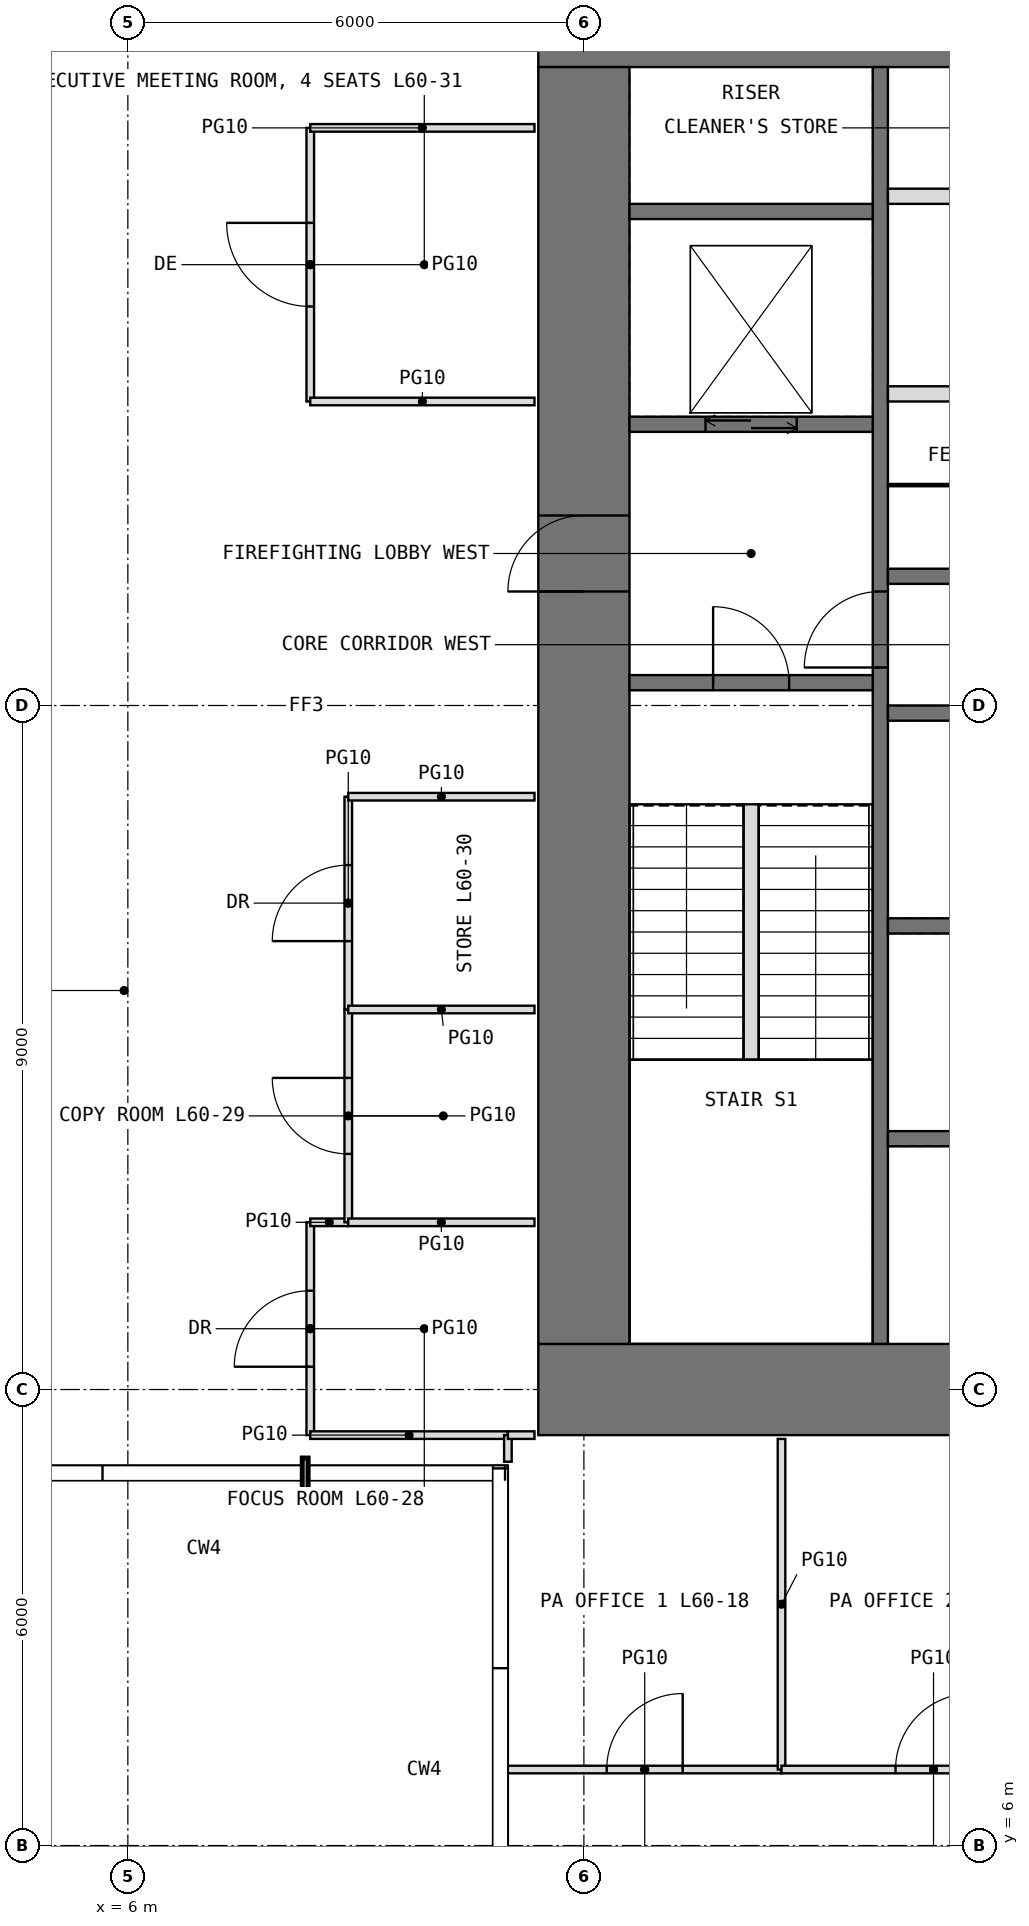
"""IFC4 building model, lengths in metres.
Left out: names, types, materials, properties, quantities, classifications, styles, units other than length and angle.
Written with IfcOpenShell. Run it as: python <this file> out.ifc"""

import sys

from ifc_helpers import new_model, si_unit, direction, frame, frame_2d, origin, place, context, subcontext, project, spatial, rectangle, extrude, element, fill, save


model = new_model("IFC4")
c1 = context("Model", 3, precision=1e-05, world=origin(), true_north=direction((0.0, 1.0)))
c2 = subcontext(c1, "Body", "Model", "MODEL_VIEW")
j1 = project(units=[si_unit("LENGTHUNIT", "METRE"), si_unit("PLANEANGLEUNIT", "RADIAN")], contexts=[c1])
p1 = place(None, origin())
s1 = spatial("IfcSite", under=j1, at=p1, CompositionType="ELEMENT")
p2 = place(p1, origin())
s2 = spatial("IfcBuilding", under=s1, at=p2, CompositionType="ELEMENT")
p3 = place(p2, frame((0.0, 0.0, 252.4)))
s3 = spatial("IfcBuildingStorey", under=s2, at=p3, CompositionType="ELEMENT", Elevation=252.4)
p4 = place(p3, frame((11.4, 12.0, -0.05), z_axis=(0.0, 0.0, 1.0), x_axis=(1.0, 0.0, 0.0)))
e1 = element("IfcWall", 1, at=p4, inside=s3, PredefinedType="SHEAR", context=c2, shape_type="SweptSolid", body=[
    extrude(rectangle(XDim=19.2, YDim=1.2, at=frame_2d((9.6, 0.0))), origin(), (0.0, 0.0, 1.0), 4.2),
])
p5 = place(p4, frame((8.6, 0.0, 0.05)))
e2 = element("IfcOpeningElement", 2, at=p5, cuts=e1, PredefinedType="OPENING", context=c2, shape_type="SweptSolid", body=[
    extrude(rectangle(XDim=2.0, YDim=2.2, at=frame_2d((1.0, 1.1))), frame((0.0, 0.61, 0.0), z_axis=(0.0, -1.0, 0.0), x_axis=(1.0, 0.0, 0.0)), (0.0, 0.0, 1.0), 1.22),
])
p6 = place(p3, frame((11.4, 30.0, -0.05), z_axis=(0.0, 0.0, 1.0), x_axis=(1.0, 0.0, 0.0)))
e3 = element("IfcWall", 3, at=p6, inside=s3, PredefinedType="SHEAR", context=c2, shape_type="SweptSolid", body=[
    extrude(rectangle(XDim=19.2, YDim=1.2, at=frame_2d((9.6, 0.0))), origin(), (0.0, 0.0, 1.0), 4.2),
])
p7 = place(p6, frame((8.6, 0.0, 0.05)))
e4 = element("IfcOpeningElement", 4, at=p7, cuts=e3, PredefinedType="OPENING", context=c2, shape_type="SweptSolid", body=[
    extrude(rectangle(XDim=2.0, YDim=2.2, at=frame_2d((1.0, 1.1))), frame((0.0, 0.61, 0.0), z_axis=(0.0, -1.0, 0.0), x_axis=(1.0, 0.0, 0.0)), (0.0, 0.0, 1.0), 1.22),
])
p8 = place(p3, frame((12.0, 12.6, -0.05), z_axis=(0.0, 0.0, 1.0), x_axis=(0.0, 1.0, 0.0)))
e5 = element("IfcWall", 5, at=p8, inside=s3, PredefinedType="SHEAR", context=c2, shape_type="SweptSolid", body=[
    extrude(rectangle(XDim=16.8, YDim=1.2, at=frame_2d((8.4, 0.0))), origin(), (0.0, 0.0, 1.0), 4.2),
])
p9 = place(p8, frame((9.9, 0.0, 0.05)))
e6 = element("IfcOpeningElement", 6, at=p9, cuts=e5, PredefinedType="OPENING", context=c2, shape_type="SweptSolid", body=[
    extrude(rectangle(XDim=1.0, YDim=2.2, at=frame_2d((0.5, 1.1))), frame((0.0, 0.61, 0.0), z_axis=(0.0, -1.0, 0.0), x_axis=(1.0, 0.0, 0.0)), (0.0, 0.0, 1.0), 1.22),
])
p10 = place(p3, frame((15.9, 12.6, -0.05), z_axis=(0.0, 0.0, 1.0), x_axis=(0.0, 1.0, 0.0)))
e7 = element("IfcWall", 7, at=p10, inside=s3, PredefinedType="SHEAR", context=c2, shape_type="SweptSolid", body=[
    extrude(rectangle(XDim=16.8, YDim=0.2, at=frame_2d((8.4, 0.0))), origin(), (0.0, 0.0, 1.0), 4.2),
])
p11 = place(p10, frame((8.9, 0.0, 0.05)))
e8 = element("IfcOpeningElement", 8, at=p11, cuts=e7, PredefinedType="OPENING", context=c2, shape_type="SweptSolid", body=[
    extrude(rectangle(XDim=1.0, YDim=2.2, at=frame_2d((0.5, 1.1))), frame((0.0, 0.11, 0.0), z_axis=(0.0, -1.0, 0.0), x_axis=(1.0, 0.0, 0.0)), (0.0, 0.0, 1.0), 0.22),
])
p12 = place(p3, frame((12.6, 21.3, -0.05), z_axis=(0.0, 0.0, 1.0), x_axis=(1.0, 0.0, 0.0)))
e9 = element("IfcWall", 9, at=p12, inside=s3, PredefinedType="SHEAR", context=c2, shape_type="SweptSolid", body=[
    extrude(rectangle(XDim=3.2, YDim=0.2, at=frame_2d((1.6, 0.0))), origin(), (0.0, 0.0, 1.0), 4.2),
])
p13 = place(p12, frame((1.1, 0.0, 0.05)))
e10 = element("IfcOpeningElement", 10, at=p13, cuts=e9, PredefinedType="OPENING", context=c2, shape_type="SweptSolid", body=[
    extrude(rectangle(XDim=1.0, YDim=2.2, at=frame_2d((0.5, 1.1))), frame((0.0, 0.11, 0.0), z_axis=(0.0, -1.0, 0.0), x_axis=(1.0, 0.0, 0.0)), (0.0, 0.0, 1.0), 0.22),
])
p14 = place(p3, frame((12.6, 24.7, -0.05), z_axis=(0.0, 0.0, 1.0), x_axis=(1.0, 0.0, 0.0)))
e11 = element("IfcWall", 11, at=p14, inside=s3, PredefinedType="SHEAR", context=c2, shape_type="SweptSolid", body=[
    extrude(rectangle(XDim=3.2, YDim=0.2, at=frame_2d((1.6, 0.0))), origin(), (0.0, 0.0, 1.0), 4.2),
])
p15 = place(p14, frame((1.0, 0.0, 0.05)))
e12 = element("IfcOpeningElement", 12, at=p15, cuts=e11, PredefinedType="OPENING", context=c2, shape_type="SweptSolid", body=[
    extrude(rectangle(XDim=1.2, YDim=2.2, at=frame_2d((0.6, 1.1))), frame((0.0, 0.11, 0.0), z_axis=(0.0, -1.0, 0.0), x_axis=(1.0, 0.0, 0.0)), (0.0, 0.0, 1.0), 0.22),
])
for number, where, z_axis, x_axis in (
    (13, (12.6, 27.5, -0.05), (0.0, 0.0, 1.0), (1.0, 0.0, 0.0)),
    (14, (16.0, 15.3, -0.05), (0.0, 0.0, 1.0), (1.0, 0.0, 0.0)),
    (15, (16.0, 18.1, -0.05), (0.0, 0.0, 1.0), (1.0, 0.0, 0.0)),
    (16, (16.0, 20.9, -0.05), (0.0, 0.0, 1.0), (1.0, 0.0, 0.0)),
    (17, (16.0, 22.7, -0.05), (0.0, 0.0, 1.0), (1.0, 0.0, 0.0)),
):
    element("IfcWall", number, at=place(p3, frame(where, z_axis=z_axis, x_axis=x_axis)), inside=s3, PredefinedType="SHEAR", context=c2, shape_type="SweptSolid", body=[
        extrude(rectangle(XDim=3.2, YDim=0.2, at=frame_2d((1.6, 0.0))), origin(), (0.0, 0.0, 1.0), 4.2),
    ])
for number, where, z_axis, x_axis in (
    (18, (16.0, 25.1, 0.0), (0.0, 0.0, 1.0), (1.0, 0.0, 0.0)),
    (19, (16.0, 27.7, 0.0), (0.0, 0.0, 1.0), (1.0, 0.0, 0.0)),
):
    element("IfcWall", number, at=place(p3, frame(where, z_axis=z_axis, x_axis=x_axis)), inside=s3, PredefinedType="PARTITIONING", context=c2, shape_type="SweptSolid", body=[
        extrude(rectangle(XDim=3.2, YDim=0.2, at=frame_2d((1.6, 0.0))), origin(), (0.0, 0.0, 1.0), 3.95),
    ])
p16 = place(p3, frame((16.0, 23.9, 0.0), z_axis=(0.0, 0.0, 1.0), x_axis=(1.0, 0.0, 0.0)))
e20 = element("IfcWall", 20, at=p16, inside=s3, PredefinedType="PARTITIONING", context=c2, shape_type="SweptSolid", body=[
    extrude(rectangle(XDim=1.4, YDim=0.03, at=frame_2d((0.7, 0.0))), origin(), (0.0, 0.0, 1.0), 3.95),
])
p17 = place(p3, frame((8.4, 11.4, 0.0), z_axis=(0.0, 0.0, 1.0), x_axis=(0.0, 1.0, 0.0)))
e21 = element("IfcWall", 21, at=p17, inside=s3, PredefinedType="PARTITIONING", context=c2, shape_type="SweptSolid", body=[
    extrude(rectangle(XDim=2.8, YDim=0.1, at=frame_2d((1.4, 0.0))), origin(), (0.0, 0.0, 1.0), 3.95),
])
p18 = place(p17, frame((0.9, 0.0, 0.0)))
e22 = element("IfcOpeningElement", 22, at=p18, cuts=e21, PredefinedType="OPENING", context=c2, shape_type="SweptSolid", body=[
    extrude(rectangle(XDim=1.0, YDim=2.2, at=frame_2d((0.5, 1.1))), frame((0.0, 0.06, 0.0), z_axis=(0.0, -1.0, 0.0), x_axis=(1.0, 0.0, 0.0)), (0.0, 0.0, 1.0), 0.12),
])
p19 = place(p3, frame((8.4, 11.4, 0.0), z_axis=(0.0, 0.0, 1.0), x_axis=(1.0, 0.0, 0.0)))
e23 = element("IfcWall", 23, at=p19, inside=s3, PredefinedType="PARTITIONING", context=c2, shape_type="SweptSolid", body=[
    extrude(rectangle(XDim=2.6, YDim=0.1, at=frame_2d((1.3, 0.0))), origin(), (0.0, 0.0, 1.0), 3.95),
])
p20 = place(p3, frame((8.4, 14.2, 0.0), z_axis=(0.0, 0.0, 1.0), x_axis=(1.0, 0.0, 0.0)))
e24 = element("IfcWall", 24, at=p20, inside=s3, PredefinedType="PARTITIONING", context=c2, shape_type="SweptSolid", body=[
    extrude(rectangle(XDim=0.5, YDim=0.1, at=frame_2d((0.25, 0.0))), origin(), (0.0, 0.0, 1.0), 3.95),
])
p21 = place(p3, frame((8.4, 25.0, 0.0), z_axis=(0.0, 0.0, 1.0), x_axis=(0.0, 1.0, 0.0)))
e25 = element("IfcWall", 25, at=p21, inside=s3, PredefinedType="PARTITIONING", context=c2, shape_type="SweptSolid", body=[
    extrude(rectangle(XDim=3.6, YDim=0.1, at=frame_2d((1.8, 0.0))), origin(), (0.0, 0.0, 1.0), 3.95),
])
p22 = place(p21, frame((1.25, 0.0, 0.0)))
e26 = element("IfcOpeningElement", 26, at=p22, cuts=e25, PredefinedType="OPENING", context=c2, shape_type="SweptSolid", body=[
    extrude(rectangle(XDim=1.1, YDim=2.3, at=frame_2d((0.55, 1.15))), frame((0.0, 0.06, 0.0), z_axis=(0.0, -1.0, 0.0), x_axis=(1.0, 0.0, 0.0)), (0.0, 0.0, 1.0), 0.12),
])
for number, where, z_axis, x_axis in (
    (27, (8.4, 25.0, 0.0), (0.0, 0.0, 1.0), (1.0, 0.0, 0.0)),
    (28, (8.4, 28.6, 0.0), (0.0, 0.0, 1.0), (1.0, 0.0, 0.0)),
):
    element("IfcWall", number, at=place(p3, frame(where, z_axis=z_axis, x_axis=x_axis)), inside=s3, PredefinedType="PARTITIONING", context=c2, shape_type="SweptSolid", body=[
        extrude(rectangle(XDim=2.95, YDim=0.1, at=frame_2d((1.475, 0.0))), origin(), (0.0, 0.0, 1.0), 3.95),
    ])
p23 = place(p3, frame((8.9, 14.2, 0.0), z_axis=(0.0, 0.0, 1.0), x_axis=(0.0, 1.0, 0.0)))
e29 = element("IfcWall", 29, at=p23, inside=s3, PredefinedType="PARTITIONING", context=c2, shape_type="SweptSolid", body=[
    extrude(rectangle(XDim=2.8, YDim=0.1, at=frame_2d((1.4, 0.0))), origin(), (0.0, 0.0, 1.0), 3.95),
])
p24 = place(p23, frame((0.9, 0.0, 0.0)))
e30 = element("IfcOpeningElement", 30, at=p24, cuts=e29, PredefinedType="OPENING", context=c2, shape_type="SweptSolid", body=[
    extrude(rectangle(XDim=1.0, YDim=2.2, at=frame_2d((0.5, 1.1))), frame((0.0, 0.06, 0.0), z_axis=(0.0, -1.0, 0.0), x_axis=(1.0, 0.0, 0.0)), (0.0, 0.0, 1.0), 0.12),
])
p25 = place(p3, frame((8.9, 14.2, 0.0), z_axis=(0.0, 0.0, 1.0), x_axis=(1.0, 0.0, 0.0)))
e31 = element("IfcWall", 31, at=p25, inside=s3, PredefinedType="PARTITIONING", context=c2, shape_type="SweptSolid", body=[
    extrude(rectangle(XDim=2.45, YDim=0.1, at=frame_2d((1.225, 0.0))), origin(), (0.0, 0.0, 1.0), 3.95),
])
p26 = place(p3, frame((8.9, 17.0, 0.0), z_axis=(0.0, 0.0, 1.0), x_axis=(0.0, 1.0, 0.0)))
e32 = element("IfcWall", 32, at=p26, inside=s3, PredefinedType="PARTITIONING", context=c2, shape_type="SweptSolid", body=[
    extrude(rectangle(XDim=2.8, YDim=0.1, at=frame_2d((1.4, 0.0))), origin(), (0.0, 0.0, 1.0), 3.95),
])
p27 = place(p26, frame((0.9, 0.0, 0.0)))
e33 = element("IfcOpeningElement", 33, at=p27, cuts=e32, PredefinedType="OPENING", context=c2, shape_type="SweptSolid", body=[
    extrude(rectangle(XDim=1.0, YDim=2.2, at=frame_2d((0.5, 1.1))), frame((0.0, 0.06, 0.0), z_axis=(0.0, -1.0, 0.0), x_axis=(1.0, 0.0, 0.0)), (0.0, 0.0, 1.0), 0.12),
])
for number, where, z_axis, x_axis in (
    (34, (8.9, 17.0, 0.0), (0.0, 0.0, 1.0), (1.0, 0.0, 0.0)),
    (35, (8.9, 19.8, 0.0), (0.0, 0.0, 1.0), (1.0, 0.0, 0.0)),
):
    element("IfcWall", number, at=place(p3, frame(where, z_axis=z_axis, x_axis=x_axis)), inside=s3, PredefinedType="PARTITIONING", context=c2, shape_type="SweptSolid", body=[
        extrude(rectangle(XDim=2.45, YDim=0.1, at=frame_2d((1.225, 0.0))), origin(), (0.0, 0.0, 1.0), 3.95),
    ])
p28 = place(p3, frame((11.0, 7.0, 0.0), z_axis=(0.0, 0.0, 1.0), x_axis=(1.0, 0.0, 0.0)))
e36 = element("IfcWall", 36, at=p28, inside=s3, PredefinedType="PARTITIONING", context=c2, shape_type="SweptSolid", body=[
    extrude(rectangle(XDim=3.6, YDim=0.1, at=frame_2d((1.8, 0.0))), origin(), (0.0, 0.0, 1.0), 3.95),
])
p29 = place(p28, frame((1.3, 0.0, 0.0)))
e37 = element("IfcOpeningElement", 37, at=p29, cuts=e36, PredefinedType="OPENING", context=c2, shape_type="SweptSolid", body=[
    extrude(rectangle(XDim=1.0, YDim=2.2, at=frame_2d((0.5, 1.1))), frame((0.0, 0.06, 0.0), z_axis=(0.0, -1.0, 0.0), x_axis=(1.0, 0.0, 0.0)), (0.0, 0.0, 1.0), 0.12),
])
p30 = place(p3, frame((11.0, 11.05, 0.0), z_axis=(0.0, 0.0, 1.0), x_axis=(0.0, 1.0, 0.0)))
e38 = element("IfcWall", 38, at=p30, inside=s3, PredefinedType="PARTITIONING", context=c2, shape_type="SweptSolid", body=[
    extrude(rectangle(XDim=0.35, YDim=0.1, at=frame_2d((0.175, 0.0))), origin(), (0.0, 0.0, 1.0), 3.95),
])
p31 = place(p3, frame((11.0, 11.4, 0.0), z_axis=(0.0, 0.0, 1.0), x_axis=(1.0, 0.0, 0.0)))
e39 = element("IfcWall", 39, at=p31, inside=s3, PredefinedType="PARTITIONING", context=c2, shape_type="SweptSolid", body=[
    extrude(rectangle(XDim=0.35, YDim=0.1, at=frame_2d((0.175, 0.0))), origin(), (0.0, 0.0, 1.0), 3.95),
])
p32 = place(p3, frame((14.6, 7.0, 0.0), z_axis=(0.0, 0.0, 1.0), x_axis=(0.0, 1.0, 0.0)))
e40 = element("IfcWall", 40, at=p32, inside=s3, PredefinedType="PARTITIONING", context=c2, shape_type="SweptSolid", body=[
    extrude(rectangle(XDim=4.35, YDim=0.1, at=frame_2d((2.175, 0.0))), origin(), (0.0, 0.0, 1.0), 3.95),
])
p33 = place(p3, frame((14.6, 7.0, 0.0), z_axis=(0.0, 0.0, 1.0), x_axis=(1.0, 0.0, 0.0)))
e41 = element("IfcWall", 41, at=p33, inside=s3, PredefinedType="PARTITIONING", context=c2, shape_type="SweptSolid", body=[
    extrude(rectangle(XDim=4.0, YDim=0.1, at=frame_2d((2.0, 0.0))), origin(), (0.0, 0.0, 1.0), 3.95),
])
p34 = place(p33, frame((1.5, 0.0, 0.0)))
e42 = element("IfcOpeningElement", 42, at=p34, cuts=e41, PredefinedType="OPENING", context=c2, shape_type="SweptSolid", body=[
    extrude(rectangle(XDim=1.0, YDim=2.2, at=frame_2d((0.5, 1.1))), frame((0.0, 0.06, 0.0), z_axis=(0.0, -1.0, 0.0), x_axis=(1.0, 0.0, 0.0)), (0.0, 0.0, 1.0), 0.12),
])
p35 = place(p3, frame((14.2, 16.34, 0.0), z_axis=(0.0, 0.0, 1.0), x_axis=(0.0, 1.0, 0.0)))
e43 = element("IfcWall", 43, at=p35, inside=s3, PredefinedType="PARTITIONING", context=c2, shape_type="SweptSolid", body=[
    extrude(rectangle(XDim=3.36, YDim=0.2, at=frame_2d((1.68, 0.0))), origin(), (0.0, 0.0, 1.0), 4.2),
])
p36 = place(p9, origin())
e44 = element("IfcDoor", 44, at=p36, inside=s3, OperationType="SINGLE_SWING_LEFT", PredefinedType="DOOR", context=c2, shape_type="SweptSolid", body=[
    extrude(rectangle(XDim=1.0, YDim=2.2, at=frame_2d((0.5, 1.1))), frame((0.0, 0.025, 0.0), z_axis=(0.0, -1.0, 0.0), x_axis=(1.0, 0.0, 0.0)), (0.0, 0.0, 1.0), 0.05),
])
fill(e6, e44)
p37 = place(p13, origin())
e45 = element("IfcDoor", 45, at=p37, inside=s3, OperationType="SINGLE_SWING_LEFT", PredefinedType="DOOR", context=c2, shape_type="SweptSolid", body=[
    extrude(rectangle(XDim=1.0, YDim=2.2, at=frame_2d((0.5, 1.1))), frame((0.0, 0.025, 0.0), z_axis=(0.0, -1.0, 0.0), x_axis=(1.0, 0.0, 0.0)), (0.0, 0.0, 1.0), 0.05),
])
fill(e10, e45)
p38 = place(p11, origin())
e46 = element("IfcDoor", 46, at=p38, inside=s3, OperationType="SINGLE_SWING_LEFT", PredefinedType="DOOR", context=c2, shape_type="SweptSolid", body=[
    extrude(rectangle(XDim=1.0, YDim=2.2, at=frame_2d((0.5, 1.1))), frame((0.0, 0.025, 0.0), z_axis=(0.0, -1.0, 0.0), x_axis=(1.0, 0.0, 0.0)), (0.0, 0.0, 1.0), 0.05),
])
fill(e8, e46)
p39 = place(p29, origin())
e47 = element("IfcDoor", 47, at=p39, inside=s3, OperationType="SINGLE_SWING_RIGHT", PredefinedType="DOOR", context=c2, shape_type="SweptSolid", body=[
    extrude(rectangle(XDim=1.0, YDim=2.2, at=frame_2d((0.5, 1.1))), frame((0.0, 0.025, 0.0), z_axis=(0.0, -1.0, 0.0), x_axis=(1.0, 0.0, 0.0)), (0.0, 0.0, 1.0), 0.05),
])
fill(e37, e47)
p40 = place(p34, origin())
e48 = element("IfcDoor", 48, at=p40, inside=s3, OperationType="SINGLE_SWING_RIGHT", PredefinedType="DOOR", context=c2, shape_type="SweptSolid", body=[
    extrude(rectangle(XDim=1.0, YDim=2.2, at=frame_2d((0.5, 1.1))), frame((0.0, 0.025, 0.0), z_axis=(0.0, -1.0, 0.0), x_axis=(1.0, 0.0, 0.0)), (0.0, 0.0, 1.0), 0.05),
])
fill(e42, e48)
p41 = place(p18, origin())
e49 = element("IfcDoor", 49, at=p41, inside=s3, OperationType="SINGLE_SWING_LEFT", PredefinedType="DOOR", context=c2, shape_type="SweptSolid", body=[
    extrude(rectangle(XDim=1.0, YDim=2.2, at=frame_2d((0.5, 1.1))), frame((0.0, 0.025, 0.0), z_axis=(0.0, -1.0, 0.0), x_axis=(1.0, 0.0, 0.0)), (0.0, 0.0, 1.0), 0.05),
])
fill(e22, e49)
p42 = place(p24, origin())
e50 = element("IfcDoor", 50, at=p42, inside=s3, OperationType="SINGLE_SWING_RIGHT", PredefinedType="DOOR", context=c2, shape_type="SweptSolid", body=[
    extrude(rectangle(XDim=1.0, YDim=2.2, at=frame_2d((0.5, 1.1))), frame((0.0, 0.025, 0.0), z_axis=(0.0, -1.0, 0.0), x_axis=(1.0, 0.0, 0.0)), (0.0, 0.0, 1.0), 0.05),
])
fill(e30, e50)
p43 = place(p27, origin())
e51 = element("IfcDoor", 51, at=p43, inside=s3, OperationType="SINGLE_SWING_LEFT", PredefinedType="DOOR", context=c2, shape_type="SweptSolid", body=[
    extrude(rectangle(XDim=1.0, YDim=2.2, at=frame_2d((0.5, 1.1))), frame((0.0, 0.025, 0.0), z_axis=(0.0, -1.0, 0.0), x_axis=(1.0, 0.0, 0.0)), (0.0, 0.0, 1.0), 0.05),
])
fill(e33, e51)
p44 = place(p22, origin())
e52 = element("IfcDoor", 52, at=p44, inside=s3, OperationType="SINGLE_SWING_RIGHT", PredefinedType="DOOR", context=c2, shape_type="SweptSolid", body=[
    extrude(rectangle(XDim=1.1, YDim=2.3, at=frame_2d((0.55, 1.15))), frame((0.0, 0.025, 0.0), z_axis=(0.0, -1.0, 0.0), x_axis=(1.0, 0.0, 0.0)), (0.0, 0.0, 1.0), 0.05),
])
fill(e26, e52)
p45 = place(p15, origin())
e53 = element("IfcDoor", 53, at=p45, inside=s3, OperationType="DOUBLE_DOOR_SLIDING", PredefinedType="DOOR", context=c2, shape_type="SweptSolid", body=[
    extrude(rectangle(XDim=1.2, YDim=2.2, at=frame_2d((0.6, 1.1))), frame((0.0, 0.025, 0.0), z_axis=(0.0, -1.0, 0.0), x_axis=(1.0, 0.0, 0.0)), (0.0, 0.0, 1.0), 0.05),
])
fill(e12, e53)
save(model, sys.argv[1])
